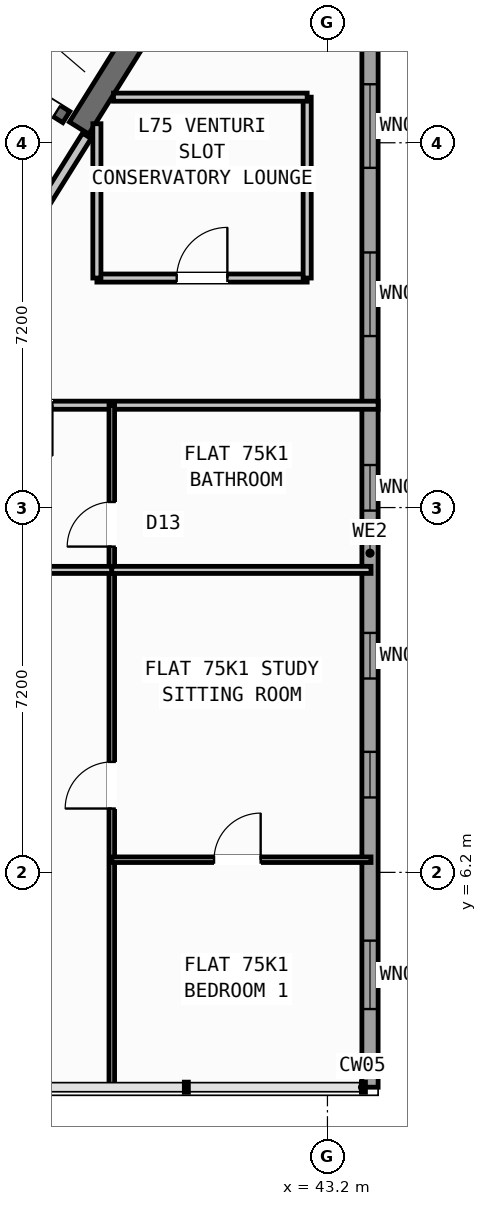
"""IFC4 building model, lengths in metres.
Left out: names, types, materials, properties, quantities, classifications, styles, units other than length and angle.
Written with IfcOpenShell. Run it as: python <this file> out.ifc"""

import sys

from ifc_helpers import new_model, si_unit, direction, frame, frame_2d, origin, place, context, subcontext, project, spatial, rectangle, extrude, source, transform, mapped, element, fill, save


model = new_model("IFC4")
c1 = context("Model", 3, precision=1e-05, world=origin(), true_north=direction((0.0, 1.0)))
c2 = subcontext(c1, "Body", "Model", "MODEL_VIEW")
j1 = project(units=[si_unit("LENGTHUNIT", "METRE"), si_unit("PLANEANGLEUNIT", "RADIAN")], contexts=[c1])
p1 = place(None, origin())
s1 = spatial("IfcSite", under=j1, at=p1, CompositionType="ELEMENT")
p2 = place(p1, origin())
s2 = spatial("IfcBuilding", under=s1, at=p2, CompositionType="ELEMENT")
p3 = place(p2, frame((0.0, 0.0, 295.2)))
s3 = spatial("IfcBuildingStorey", under=s2, at=p3, CompositionType="ELEMENT", Elevation=295.2)
p4 = place(p3, frame((40.221, 23.965, 0.0), z_axis=(0.0, 0.0, 1.0), x_axis=(-0.529902075036, -0.848058836916, 0.0)))
e1 = element("IfcWall", 1, at=p4, inside=s3, PredefinedType="SHEAR", context=c2, shape_type="SweptSolid", body=[
    extrude(rectangle(XDim=3.625, YDim=0.45, at=frame_2d((1.812, 0.0))), origin(), (0.0, 0.0, 1.0), 3.32),
])
p5 = place(p3, frame((44.04, 23.04, 0.0), z_axis=(0.0, 0.0, 1.0), x_axis=(0.0, -1.0, 0.0)))
e2 = element("IfcWall", 2, at=p5, inside=s3, PredefinedType="STANDARD", context=c2, shape_type="SweptSolid", body=[
    extrude(rectangle(XDim=21.08, YDim=0.32, at=frame_2d((10.54, 0.0))), origin(), (0.0, 0.0, 1.0), 3.32),
])
p6 = place(p5, frame((1.285, 0.0, 0.9)))
e3 = element("IfcOpeningElement", 3, at=p6, cuts=e2, PredefinedType="OPENING", context=c2, shape_type="SweptSolid", body=[
    extrude(rectangle(XDim=1.65, YDim=1.45, at=frame_2d((0.825, 0.725))), frame((0.0, 0.17, 0.0), z_axis=(0.0, -1.0, 0.0), x_axis=(1.0, 0.0, 0.0)), (0.0, 0.0, 1.0), 0.34),
])
p7 = place(p5, frame((4.605, 0.0, 0.9)))
e4 = element("IfcOpeningElement", 4, at=p7, cuts=e2, PredefinedType="OPENING", context=c2, shape_type="SweptSolid", body=[
    extrude(rectangle(XDim=1.65, YDim=1.45, at=frame_2d((0.825, 0.725))), frame((0.0, 0.17, 0.0), z_axis=(0.0, -1.0, 0.0), x_axis=(1.0, 0.0, 0.0)), (0.0, 0.0, 1.0), 0.34),
])
p8 = place(p5, frame((8.8, 0.0, 1.0)))
e5 = element("IfcOpeningElement", 5, at=p8, cuts=e2, PredefinedType="OPENING", context=c2, shape_type="SweptSolid", body=[
    extrude(rectangle(XDim=0.9, YDim=1.25, at=frame_2d((0.45, 0.625))), frame((0.0, 0.17, 0.0), z_axis=(0.0, -1.0, 0.0), x_axis=(1.0, 0.0, 0.0)), (0.0, 0.0, 1.0), 0.34),
])
p9 = place(p5, frame((12.114, 0.0, 1.0)))
e6 = element("IfcOpeningElement", 6, at=p9, cuts=e2, PredefinedType="OPENING", context=c2, shape_type="SweptSolid", body=[
    extrude(rectangle(XDim=0.9, YDim=1.25, at=frame_2d((0.45, 0.625))), frame((0.0, 0.17, 0.0), z_axis=(0.0, -1.0, 0.0), x_axis=(1.0, 0.0, 0.0)), (0.0, 0.0, 1.0), 0.34),
])
p10 = place(p5, frame((14.461, 0.0, 1.0)))
e7 = element("IfcOpeningElement", 7, at=p10, cuts=e2, PredefinedType="OPENING", context=c2, shape_type="SweptSolid", body=[
    extrude(rectangle(XDim=0.9, YDim=1.25, at=frame_2d((0.45, 0.625))), frame((0.0, 0.17, 0.0), z_axis=(0.0, -1.0, 0.0), x_axis=(1.0, 0.0, 0.0)), (0.0, 0.0, 1.0), 0.34),
])
p11 = place(p5, frame((18.188, 0.0, 0.9)))
e8 = element("IfcOpeningElement", 8, at=p11, cuts=e2, PredefinedType="OPENING", context=c2, shape_type="SweptSolid", body=[
    extrude(rectangle(XDim=1.35, YDim=1.45, at=frame_2d((0.675, 0.725))), frame((0.0, 0.17, 0.0), z_axis=(0.0, -1.0, 0.0), x_axis=(1.0, 0.0, 0.0)), (0.0, 0.0, 1.0), 0.34),
])
p12 = place(p3, frame((38.046, 21.108, 0.0), z_axis=(0.0, 0.0, 1.0), x_axis=(-0.848054434086, 0.529909121291, 0.0)))
e9 = element("IfcWall", 9, at=p12, inside=s3, PredefinedType="SHEAR", context=c2, shape_type="SweptSolid", body=[
    extrude(rectangle(XDim=7.33, YDim=0.26, at=frame_2d((3.665, 0.0))), origin(), (0.0, 0.0, 1.0), 3.32),
])
p13 = place(p12, frame((0.22, 0.0, 0.0)))
e10 = element("IfcOpeningElement", 10, at=p13, cuts=e9, PredefinedType="OPENING", context=c2, shape_type="SweptSolid", body=[
    extrude(rectangle(XDim=1.1, YDim=2.1, at=frame_2d((0.55, 1.05))), frame((0.0, 0.14, 0.0), z_axis=(0.0, -1.0, 0.0), x_axis=(1.0, 0.0, 0.0)), (0.0, 0.0, 1.0), 0.28),
])
p14 = place(p3, frame((38.451, 20.737, 0.0), z_axis=(0.0, 0.0, 1.0), x_axis=(-0.529924799939, -0.848044637038, 0.0)))
e11 = element("IfcWall", 11, at=p14, inside=s3, PredefinedType="STANDARD", context=c2, shape_type="SweptSolid", body=[
    extrude(rectangle(XDim=2.96, YDim=0.2, at=frame_2d((1.48, 0.0))), origin(), (0.0, 0.0, 1.0), 3.31),
])
p15 = place(p14, frame((1.46, 0.0, 0.0)))
e12 = element("IfcOpeningElement", 12, at=p15, cuts=e11, PredefinedType="OPENING", context=c2, shape_type="SweptSolid", body=[
    extrude(rectangle(XDim=0.86, YDim=2.05, at=frame_2d((0.43, 1.025))), frame((0.0, 0.11, 0.0), z_axis=(0.0, -1.0, 0.0), x_axis=(1.0, 0.0, 0.0)), (0.0, 0.0, 1.0), 0.22),
])
p16 = place(p3, frame((35.178, 15.42, 0.0), z_axis=(0.0, 0.0, 1.0), x_axis=(1.0, 0.0, 0.0)))
e13 = element("IfcWall", 13, at=p16, inside=s3, PredefinedType="PARTITIONING", context=c2, shape_type="SweptSolid", body=[
    extrude(rectangle(XDim=9.021, YDim=0.16, at=frame_2d((4.511, 0.0))), origin(), (0.0, 0.0, 1.0), 3.31),
])
p17 = place(p16, frame((1.594, 0.0, 0.0)))
e14 = element("IfcOpeningElement", 14, at=p17, cuts=e13, PredefinedType="OPENING", context=c2, shape_type="SweptSolid", body=[
    extrude(rectangle(XDim=1.0, YDim=2.1, at=frame_2d((0.5, 1.05))), frame((0.0, 0.09, 0.0), z_axis=(0.0, -1.0, 0.0), x_axis=(1.0, 0.0, 0.0)), (0.0, 0.0, 1.0), 0.18),
])
p18 = place(p3, frame((38.65, 17.93, 0.0), z_axis=(0.0, 0.0, 1.0), x_axis=(1.0, 0.0, 0.0)))
e15 = element("IfcWall", 15, at=p18, inside=s3, PredefinedType="PARTITIONING", context=c2, shape_type="SweptSolid", body=[
    extrude(rectangle(XDim=4.15, YDim=0.16, at=frame_2d((2.075, 0.0))), origin(), (0.0, 0.0, 1.0), 3.31),
])
p19 = place(p18, frame((1.575, 0.0, 0.0)))
e16 = element("IfcOpeningElement", 16, at=p19, cuts=e15, PredefinedType="OPENING", context=c2, shape_type="SweptSolid", body=[
    extrude(rectangle(XDim=1.0, YDim=2.1, at=frame_2d((0.5, 1.05))), frame((0.0, 0.09, 0.0), z_axis=(0.0, -1.0, 0.0), x_axis=(1.0, 0.0, 0.0)), (0.0, 0.0, 1.0), 0.18),
])
p20 = place(p3, frame((38.65, 17.93, 0.0), z_axis=(0.0, 0.0, 1.0), x_axis=(0.0, 1.0, 0.0)))
e17 = element("IfcWall", 17, at=p20, inside=s3, PredefinedType="PARTITIONING", context=c2, shape_type="SweptSolid", body=[
    extrude(rectangle(XDim=3.046, YDim=0.16, at=frame_2d((1.523, 0.0))), origin(), (0.0, 0.0, 1.0), 3.31),
])
p21 = place(p3, frame((42.8, 17.93, 0.0), z_axis=(0.0, 0.0, 1.0), x_axis=(0.0, 1.0, 0.0)))
e18 = element("IfcWall", 18, at=p21, inside=s3, PredefinedType="PARTITIONING", context=c2, shape_type="SweptSolid", body=[
    extrude(rectangle(XDim=3.57, YDim=0.16, at=frame_2d((1.785, 0.0))), origin(), (0.0, 0.0, 1.0), 3.31),
])
p22 = place(p3, frame((38.978, 21.5, 0.0), z_axis=(0.0, 0.0, 1.0), x_axis=(1.0, 0.0, 0.0)))
e19 = element("IfcWall", 19, at=p22, inside=s3, PredefinedType="PARTITIONING", context=c2, shape_type="SweptSolid", body=[
    extrude(rectangle(XDim=3.823, YDim=0.16, at=frame_2d((1.911, 0.0))), origin(), (0.0, 0.0, 1.0), 3.31),
])
p23 = place(p3, frame((38.944, 1.96, 0.0), z_axis=(0.0, 0.0, 1.0), x_axis=(0.0, 1.0, 0.0)))
e20 = element("IfcWall", 20, at=p23, inside=s3, PredefinedType="PARTITIONING", context=c2, shape_type="SweptSolid", body=[
    extrude(rectangle(XDim=13.46, YDim=0.11, at=frame_2d((6.73, 0.0))), origin(), (0.0, 0.0, 1.0), 3.31),
])
p24 = place(p23, frame((5.5, 0.0, 0.0)))
e21 = element("IfcOpeningElement", 21, at=p24, cuts=e20, PredefinedType="OPENING", context=c2, shape_type="SweptSolid", body=[
    extrude(rectangle(XDim=0.92, YDim=2.08, at=frame_2d((0.46, 1.04))), frame((0.0, 0.065, 0.0), z_axis=(0.0, -1.0, 0.0), x_axis=(1.0, 0.0, 0.0)), (0.0, 0.0, 1.0), 0.13),
])
p25 = place(p23, frame((10.67, 0.0, 0.0)))
e22 = element("IfcOpeningElement", 22, at=p25, cuts=e20, PredefinedType="OPENING", context=c2, shape_type="SweptSolid", body=[
    extrude(rectangle(XDim=0.88, YDim=2.08, at=frame_2d((0.44, 1.04))), frame((0.0, 0.065, 0.0), z_axis=(0.0, -1.0, 0.0), x_axis=(1.0, 0.0, 0.0)), (0.0, 0.0, 1.0), 0.13),
])
p26 = place(p3, frame((33.525, 12.17, 0.0), z_axis=(0.0, 0.0, 1.0), x_axis=(1.0, 0.0, 0.0)))
e23 = element("IfcWall", 23, at=p26, inside=s3, PredefinedType="PLUMBINGWALL", context=c2, shape_type="SweptSolid", body=[
    extrude(rectangle(XDim=5.419, YDim=0.14, at=frame_2d((2.709, 0.0))), origin(), (0.0, 0.0, 1.0), 3.31),
])
p27 = place(p26, frame((1.537, 0.0, 0.0)))
e24 = element("IfcOpeningElement", 24, at=p27, cuts=e23, PredefinedType="OPENING", context=c2, shape_type="SweptSolid", body=[
    extrude(rectangle(XDim=0.92, YDim=2.08, at=frame_2d((0.46, 1.04))), frame((0.0, 0.08, 0.0), z_axis=(0.0, -1.0, 0.0), x_axis=(1.0, 0.0, 0.0)), (0.0, 0.0, 1.0), 0.16),
])
p28 = place(p3, frame((38.944, 12.17, 0.0), z_axis=(0.0, 0.0, 1.0), x_axis=(1.0, 0.0, 0.0)))
e25 = element("IfcWall", 25, at=p28, inside=s3, PredefinedType="PLUMBINGWALL", context=c2, shape_type="SweptSolid", body=[
    extrude(rectangle(XDim=5.116, YDim=0.14, at=frame_2d((2.558, 0.0))), origin(), (0.0, 0.0, 1.0), 3.31),
])
p29 = place(p3, frame((38.944, 6.45, 0.0), z_axis=(0.0, 0.0, 1.0), x_axis=(1.0, 0.0, 0.0)))
e26 = element("IfcWall", 26, at=p29, inside=s3, PredefinedType="PARTITIONING", context=c2, shape_type="SweptSolid", body=[
    extrude(rectangle(XDim=5.116, YDim=0.11, at=frame_2d((2.558, 0.0))), origin(), (0.0, 0.0, 1.0), 3.31),
])
p30 = place(p29, frame((2.018, 0.0, 0.0)))
e27 = element("IfcOpeningElement", 27, at=p30, cuts=e26, PredefinedType="OPENING", context=c2, shape_type="SweptSolid", body=[
    extrude(rectangle(XDim=0.92, YDim=2.08, at=frame_2d((0.46, 1.04))), frame((0.0, 0.065, 0.0), z_axis=(0.0, -1.0, 0.0), x_axis=(1.0, 0.0, 0.0)), (0.0, 0.0, 1.0), 0.13),
])
m1 = source(origin(), c2, "Body", "SweptSolid", [
    extrude(rectangle(XDim=1.65, YDim=1.45, at=frame_2d((0.825, 0.725))), frame((0.0, 0.03, 0.0), z_axis=(0.0, -1.0, 0.0), x_axis=(1.0, 0.0, 0.0)), (0.0, 0.0, 1.0), 0.06),
])
p31 = place(p6, origin())
e28 = element("IfcWindow", 28, at=p31, inside=s3, PartitioningType="SINGLE_PANEL", PredefinedType="WINDOW", context=c2, shape_type="MappedRepresentation", body=[
    mapped(m1, transform((0.0, 0.0, 0.0), scale=1.0)),
])
fill(e3, e28)
p32 = place(p7, origin())
e29 = element("IfcWindow", 29, at=p32, inside=s3, PartitioningType="SINGLE_PANEL", PredefinedType="WINDOW", context=c2, shape_type="MappedRepresentation", body=[
    mapped(m1, transform((0.0, 0.0, 0.0), scale=1.0)),
])
fill(e4, e29)
m2 = source(origin(), c2, "Body", "SweptSolid", [
    extrude(rectangle(XDim=0.9, YDim=1.25, at=frame_2d((0.45, 0.625))), frame((0.0, 0.03, 0.0), z_axis=(0.0, -1.0, 0.0), x_axis=(1.0, 0.0, 0.0)), (0.0, 0.0, 1.0), 0.06),
])
p33 = place(p8, origin())
e30 = element("IfcWindow", 30, at=p33, inside=s3, PartitioningType="SINGLE_PANEL", PredefinedType="WINDOW", context=c2, shape_type="MappedRepresentation", body=[
    mapped(m2, transform((0.0, 0.0, 0.0), scale=1.0)),
])
fill(e5, e30)
p34 = place(p9, origin())
e31 = element("IfcWindow", 31, at=p34, inside=s3, PartitioningType="SINGLE_PANEL", PredefinedType="WINDOW", context=c2, shape_type="MappedRepresentation", body=[
    mapped(m2, transform((0.0, 0.0, 0.0), scale=1.0)),
])
fill(e6, e31)
p35 = place(p10, origin())
e32 = element("IfcWindow", 32, at=p35, inside=s3, PartitioningType="SINGLE_PANEL", PredefinedType="WINDOW", context=c2, shape_type="MappedRepresentation", body=[
    mapped(m2, transform((0.0, 0.0, 0.0), scale=1.0)),
])
fill(e7, e32)
m3 = source(origin(), c2, "Body", "SweptSolid", [
    extrude(rectangle(XDim=1.35, YDim=1.45, at=frame_2d((0.675, 0.725))), frame((0.0, 0.03, 0.0), z_axis=(0.0, -1.0, 0.0), x_axis=(1.0, 0.0, 0.0)), (0.0, 0.0, 1.0), 0.06),
])
p36 = place(p11, origin())
e33 = element("IfcWindow", 33, at=p36, inside=s3, PartitioningType="SINGLE_PANEL", PredefinedType="WINDOW", context=c2, shape_type="MappedRepresentation", body=[
    mapped(m3, transform((0.0, 0.0, 0.0), scale=1.0)),
])
fill(e8, e33)
m4 = source(origin(), c2, "Body", "SweptSolid", [
    extrude(rectangle(XDim=1.1, YDim=2.1, at=frame_2d((0.55, 1.05))), frame((0.0, 0.025, 0.0), z_axis=(0.0, -1.0, 0.0), x_axis=(1.0, 0.0, 0.0)), (0.0, 0.0, 1.0), 0.05),
])
p37 = place(p13, origin())
e34 = element("IfcDoor", 34, at=p37, inside=s3, OperationType="SINGLE_SWING_RIGHT", PredefinedType="DOOR", context=c2, shape_type="MappedRepresentation", body=[
    mapped(m4, transform((0.0, 0.0, 0.0), scale=1.0)),
])
fill(e10, e34)
m5 = source(origin(), c2, "Body", "SweptSolid", [
    extrude(rectangle(XDim=1.0, YDim=2.1, at=frame_2d((0.5, 1.05))), frame((0.0, 0.025, 0.0), z_axis=(0.0, -1.0, 0.0), x_axis=(1.0, 0.0, 0.0)), (0.0, 0.0, 1.0), 0.05),
])
p38 = place(p19, origin())
e35 = element("IfcDoor", 35, at=p38, inside=s3, OperationType="SINGLE_SWING_RIGHT", PredefinedType="DOOR", context=c2, shape_type="MappedRepresentation", body=[
    mapped(m5, transform((0.0, 0.0, 0.0), scale=1.0)),
])
fill(e16, e35)
m6 = source(origin(), c2, "Body", "SweptSolid", [
    extrude(rectangle(XDim=0.92, YDim=2.08, at=frame_2d((0.46, 1.04))), frame((0.0, 0.025, 0.0), z_axis=(0.0, -1.0, 0.0), x_axis=(1.0, 0.0, 0.0)), (0.0, 0.0, 1.0), 0.05),
])
p39 = place(p24, origin())
e36 = element("IfcDoor", 36, at=p39, inside=s3, OperationType="SINGLE_SWING_LEFT", PredefinedType="DOOR", context=c2, shape_type="MappedRepresentation", body=[
    mapped(m6, transform((0.0, 0.0, 0.0), scale=1.0)),
])
fill(e21, e36)
p40 = place(p30, origin())
e37 = element("IfcDoor", 37, at=p40, inside=s3, OperationType="SINGLE_SWING_RIGHT", PredefinedType="DOOR", context=c2, shape_type="MappedRepresentation", body=[
    mapped(m6, transform((0.0, 0.0, 0.0), scale=1.0)),
])
fill(e27, e37)
p41 = place(p17, frame((1.0, 0.0, 0.0), z_axis=(0.0, 0.0, 1.0), x_axis=(-1.0, 0.0, 0.0)))
e38 = element("IfcDoor", 38, at=p41, inside=s3, OperationType="SINGLE_SWING_LEFT", PredefinedType="DOOR", context=c2, shape_type="MappedRepresentation", body=[
    mapped(m5, transform((0.0, 0.0, 0.0), scale=1.0)),
])
fill(e14, e38)
m7 = source(origin(), c2, "Body", "SweptSolid", [
    extrude(rectangle(XDim=0.88, YDim=2.08, at=frame_2d((0.44, 1.04))), frame((0.0, 0.025, 0.0), z_axis=(0.0, -1.0, 0.0), x_axis=(1.0, 0.0, 0.0)), (0.0, 0.0, 1.0), 0.05),
])
p42 = place(p25, origin())
e39 = element("IfcDoor", 39, at=p42, inside=s3, OperationType="SINGLE_SWING_LEFT", PredefinedType="DOOR", context=c2, shape_type="MappedRepresentation", body=[
    mapped(m7, transform((0.0, 0.0, 0.0), scale=1.0)),
])
fill(e22, e39)
save(model, sys.argv[1])
